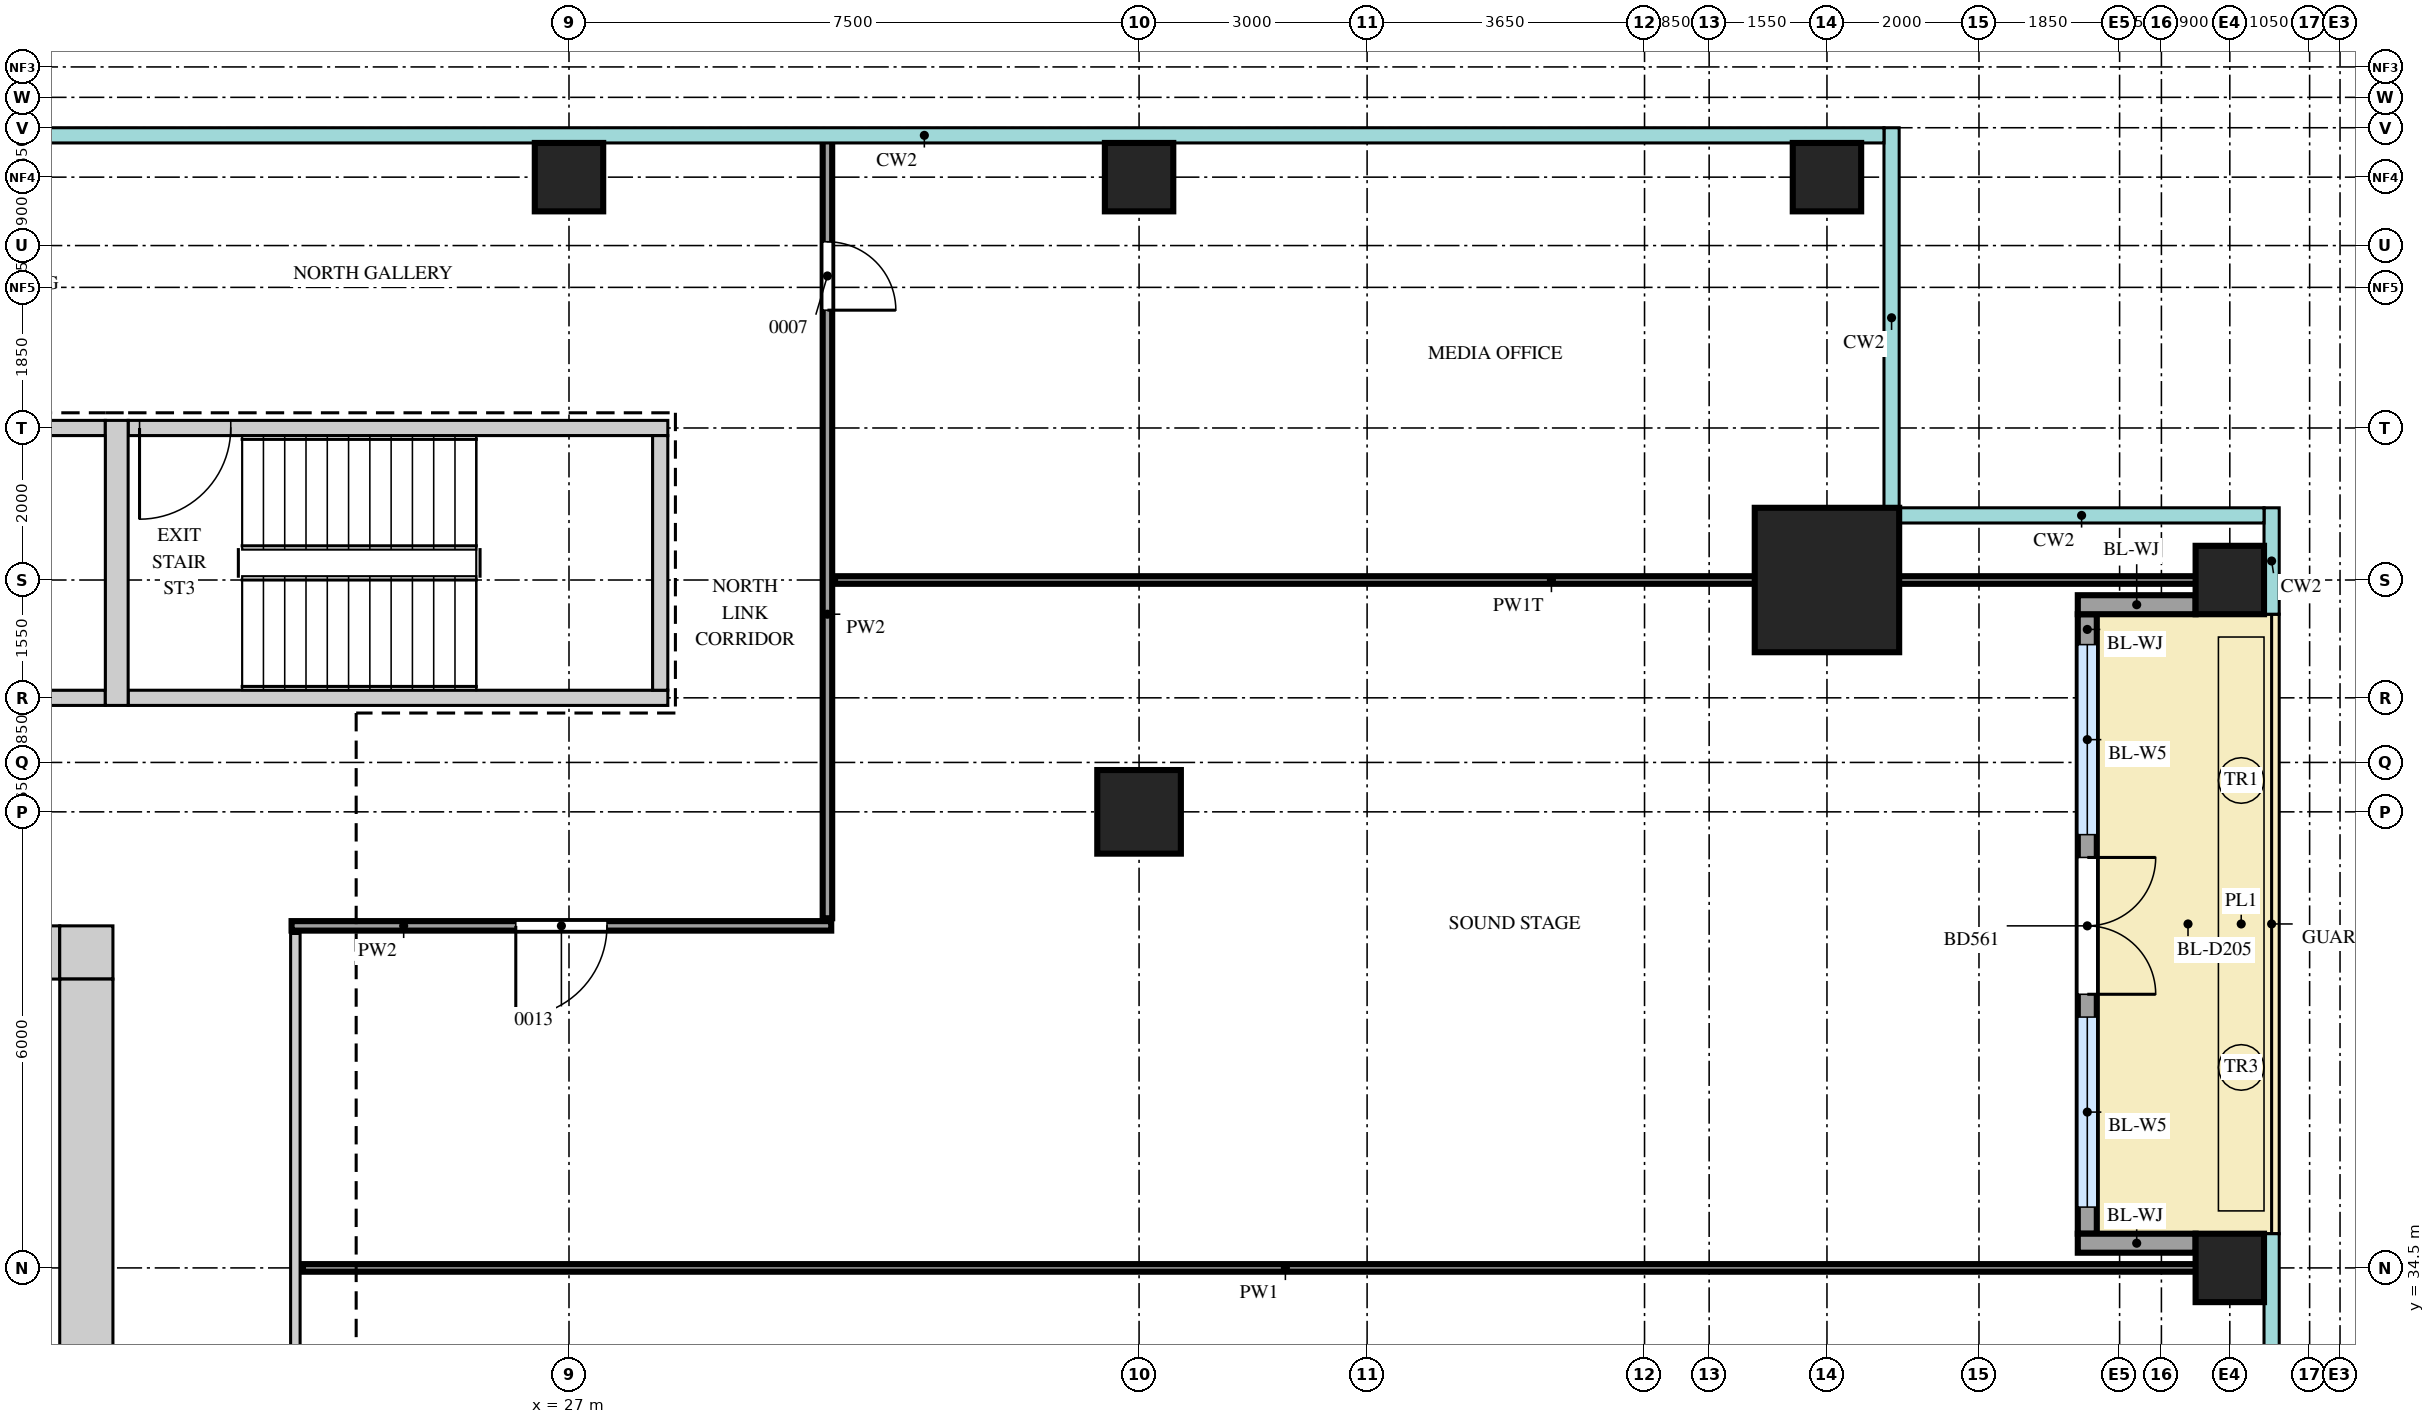
"""IFC4 building model, lengths in metres.
Left out: names, types, materials, properties, quantities, classifications, styles, units other than length and angle.
Written with IfcOpenShell. Run it as: python <this file> out.ifc"""

import sys

from ifc_helpers import new_model, si_unit, direction, frame, frame_2d, origin, origin_2d, place, context, subcontext, project, spatial, rectangle, extrude, source, transform, mapped, element, fill, save


model = new_model("IFC4")
c1 = context("Model", 3, precision=1e-05, world=origin(), true_north=direction((0.0, 1.0)))
c2 = subcontext(c1, "Body", "Model", "MODEL_VIEW")
j1 = project(units=[si_unit("LENGTHUNIT", "METRE"), si_unit("PLANEANGLEUNIT", "RADIAN")], contexts=[c1])
p1 = place(None, origin())
s1 = spatial("IfcSite", under=j1, at=p1, CompositionType="ELEMENT")
p2 = place(p1, origin())
s2 = spatial("IfcBuilding", under=s1, at=p2, CompositionType="ELEMENT")
p3 = place(p2, frame((0.0, 0.0, 250.2)))
s3 = spatial("IfcBuildingStorey", under=s2, at=p3, CompositionType="ELEMENT", Elevation=250.2)
m1 = source(origin(), c2, "Body", "SweptSolid", [
    extrude(rectangle(XDim=13.6, YDim=0.7, at=frame_2d((6.8, 0.0))), origin(), (0.0, 0.0, 1.0), 3.75),
])
p4 = place(p3, frame((6.7, 38.65, 0.0), z_axis=(0.0, 0.0, 1.0), x_axis=(1.0, 0.0, 0.0)))
e1 = element("IfcWall", 1, at=p4, inside=s3, PredefinedType="SHEAR", context=c2, shape_type="MappedRepresentation", body=[
    mapped(m1, transform((0.0, 0.0, 0.0))),
])
m2 = source(origin(), c2, "Body", "SweptSolid", [
    extrude(rectangle(XDim=0.9, YDim=2.1, at=frame_2d((0.45, 1.05))), frame((0.0, 0.36, 0.0), z_axis=(0.0, -1.0, 0.0), x_axis=(1.0, 0.0, 0.0)), (0.0, 0.0, 1.0), 0.72),
])
p5 = place(p4, frame((3.0, 0.0, 0.0)))
e2 = element("IfcOpeningElement", 2, at=p5, cuts=e1, PredefinedType="OPENING", context=c2, shape_type="MappedRepresentation", body=[
    mapped(m2, transform((0.0, 0.0, 0.0))),
])
p6 = place(p4, frame((9.7, 0.0, 0.0)))
e3 = element("IfcOpeningElement", 3, at=p6, cuts=e1, PredefinedType="OPENING", context=c2, shape_type="MappedRepresentation", body=[
    mapped(m2, transform((0.0, 0.0, 0.0))),
])
m3 = source(origin(), c2, "Body", "SweptSolid", [
    extrude(rectangle(XDim=0.7, YDim=0.7, at=frame_2d((0.35, 0.0))), origin(), (0.0, 0.0, 1.0), 3.75),
])
p7 = place(p3, frame((20.3, 38.65, 0.0), z_axis=(0.0, 0.0, 1.0), x_axis=(1.0, 0.0, 0.0)))
e4 = element("IfcWall", 4, at=p7, inside=s3, PredefinedType="SHEAR", context=c2, shape_type="MappedRepresentation", body=[
    mapped(m3, transform((0.0, 0.0, 0.0))),
])
m4 = source(origin(), c2, "Body", "SweptSolid", [
    extrude(rectangle(XDim=22.6, YDim=0.7, at=frame_2d((11.3, 0.0))), origin(), (0.0, 0.0, 1.0), 3.75),
])
p8 = place(p3, frame((20.65, 15.7, 0.0), z_axis=(0.0, 0.0, 1.0), x_axis=(0.0, 1.0, 0.0)))
e5 = element("IfcWall", 5, at=p8, inside=s3, PredefinedType="SHEAR", context=c2, shape_type="MappedRepresentation", body=[
    mapped(m4, transform((0.0, 0.0, 0.0))),
])
m5 = source(origin(), c2, "Body", "SweptSolid", [
    extrude(rectangle(XDim=1.8, YDim=2.1, at=frame_2d((0.9, 1.05))), frame((0.0, 0.36, 0.0), z_axis=(0.0, -1.0, 0.0), x_axis=(1.0, 0.0, 0.0)), (0.0, 0.0, 1.0), 0.72),
])
p9 = place(p8, frame((10.8, 0.0, 0.0)))
e6 = element("IfcOpeningElement", 6, at=p9, cuts=e5, PredefinedType="OPENING", context=c2, shape_type="MappedRepresentation", body=[
    mapped(m5, transform((0.0, 0.0, 0.0))),
])
p10 = place(p8, frame((0.45, 0.0, 0.0)))
e7 = element("IfcOpeningElement", 7, at=p10, cuts=e5, PredefinedType="OPENING", context=c2, shape_type="MappedRepresentation", body=[
    mapped(m2, transform((0.0, 0.0, 0.0))),
])
p11 = place(p8, frame((2.9, 0.0, 0.0)))
e8 = element("IfcOpeningElement", 8, at=p11, cuts=e5, PredefinedType="OPENING", context=c2, shape_type="MappedRepresentation", body=[
    mapped(m2, transform((0.0, 0.0, 0.0))),
])
p12 = place(p8, frame((5.65, 0.0, 0.0)))
e9 = element("IfcOpeningElement", 9, at=p12, cuts=e5, PredefinedType="OPENING", context=c2, shape_type="MappedRepresentation", body=[
    mapped(m2, transform((0.0, 0.0, 0.0))),
])
m6 = source(origin(), c2, "Body", "SweptSolid", [
    extrude(rectangle(XDim=7.0, YDim=0.2, at=frame_2d((3.5, 0.0))), origin(), (0.0, 0.0, 1.0), 3.75),
])
p13 = place(p3, frame((13.9, 45.55, 0.0), z_axis=(0.0, 0.0, 1.0), x_axis=(1.0, 0.0, 0.0)))
e10 = element("IfcWall", 10, at=p13, inside=s3, PredefinedType="SHEAR", context=c2, shape_type="MappedRepresentation", body=[
    mapped(m6, transform((0.0, 0.0, 0.0))),
])
m7 = source(origin(), c2, "Body", "SweptSolid", [
    extrude(rectangle(XDim=1.2, YDim=2.1, at=frame_2d((0.6, 1.05))), frame((0.0, 0.11, 0.0), z_axis=(0.0, -1.0, 0.0), x_axis=(1.0, 0.0, 0.0)), (0.0, 0.0, 1.0), 0.22),
])
p14 = place(p13, frame((0.35, 0.0, 0.0)))
e11 = element("IfcOpeningElement", 11, at=p14, cuts=e10, PredefinedType="OPENING", context=c2, shape_type="MappedRepresentation", body=[
    mapped(m7, transform((0.0, 0.0, 0.0))),
])
p15 = place(p3, frame((13.9, 42.0, 0.0), z_axis=(0.0, 0.0, 1.0), x_axis=(1.0, 0.0, 0.0)))
e12 = element("IfcWall", 12, at=p15, inside=s3, PredefinedType="SHEAR", context=c2, shape_type="MappedRepresentation", body=[
    mapped(m6, transform((0.0, 0.0, 0.0))),
])
m8 = source(origin(), c2, "Body", "SweptSolid", [
    extrude(rectangle(XDim=7.1, YDim=0.2, at=frame_2d((3.55, 0.0))), origin(), (0.0, 0.0, 1.0), 3.75),
])
p16 = place(p3, frame((21.2, 45.55, 0.0), z_axis=(0.0, 0.0, 1.0), x_axis=(1.0, 0.0, 0.0)))
e13 = element("IfcWall", 13, at=p16, inside=s3, PredefinedType="SHEAR", context=c2, shape_type="MappedRepresentation", body=[
    mapped(m8, transform((0.0, 0.0, 0.0))),
])
p17 = place(p16, frame((0.15, 0.0, 0.0)))
e14 = element("IfcOpeningElement", 14, at=p17, cuts=e13, PredefinedType="OPENING", context=c2, shape_type="MappedRepresentation", body=[
    mapped(m7, transform((0.0, 0.0, 0.0))),
])
p18 = place(p3, frame((21.2, 42.0, 0.0), z_axis=(0.0, 0.0, 1.0), x_axis=(1.0, 0.0, 0.0)))
e15 = element("IfcWall", 15, at=p18, inside=s3, PredefinedType="SHEAR", context=c2, shape_type="MappedRepresentation", body=[
    mapped(m8, transform((0.0, 0.0, 0.0))),
])
m9 = source(origin(), c2, "Body", "SweptSolid", [
    extrude(rectangle(XDim=3.75, YDim=0.3, at=frame_2d((1.875, 0.0))), origin(), (0.0, 0.0, 1.0), 3.75),
])
p19 = place(p3, frame((21.05, 41.9, 0.0), z_axis=(0.0, 0.0, 1.0), x_axis=(0.0, 1.0, 0.0)))
e16 = element("IfcWall", 16, at=p19, inside=s3, PredefinedType="SHEAR", context=c2, shape_type="MappedRepresentation", body=[
    mapped(m9, transform((0.0, 0.0, 0.0))),
])
m10 = source(origin(), c2, "Body", "SweptSolid", [
    extrude(rectangle(XDim=3.35, YDim=0.2, at=frame_2d((1.675, 0.0))), origin(), (0.0, 0.0, 1.0), 3.75),
])
p20 = place(p3, frame((28.2, 42.1, 0.0), z_axis=(0.0, 0.0, 1.0), x_axis=(0.0, 1.0, 0.0)))
e17 = element("IfcWall", 17, at=p20, inside=s3, PredefinedType="SHEAR", context=c2, shape_type="MappedRepresentation", body=[
    mapped(m10, transform((0.0, 0.0, 0.0))),
])
m11 = source(origin(), c2, "Body", "SweptSolid", [
    extrude(rectangle(XDim=1.9, YDim=1.9, at=origin_2d()), origin(), (0.0, 0.0, 1.0), 4.0),
])
p21 = place(p3, frame((43.55, 43.55, 0.0), z_axis=(0.0, 0.0, 1.0), x_axis=(1.0, 0.0, 0.0)))
e18 = element("IfcColumn", 18, at=p21, inside=s3, PredefinedType="COLUMN", context=c2, shape_type="MappedRepresentation", body=[
    mapped(m11, transform((0.0, 0.0, 0.0))),
])
m12 = source(origin(), c2, "Body", "SweptSolid", [
    extrude(rectangle(XDim=0.9, YDim=0.9, at=origin_2d()), origin(), (0.0, 0.0, 1.0), 3.75),
])
for number, where, z_axis, x_axis in (
    (19, (48.85, 34.5, 0.0), (0.0, 0.0, 1.0), (1.0, 0.0, 0.0)),
    (20, (48.85, 43.55, 0.0), (0.0, 0.0, 1.0), (1.0, 0.0, 0.0)),
    (21, (27.0, 48.85, 0.0), (0.0, 0.0, 1.0), (1.0, 0.0, 0.0)),
    (22, (34.5, 48.85, 0.0), (0.0, 0.0, 1.0), (1.0, 0.0, 0.0)),
    (23, (43.55, 48.85, 0.0), (0.0, 0.0, 1.0), (1.0, 0.0, 0.0)),
):
    element("IfcColumn", number, at=place(p3, frame(where, z_axis=z_axis, x_axis=x_axis)), inside=s3, PredefinedType="COLUMN", context=c2, shape_type="MappedRepresentation", body=[
        mapped(m12, transform((0.0, 0.0, 0.0))),
    ])
m13 = source(origin(), c2, "Body", "SweptSolid", [
    extrude(rectangle(XDim=1.1, YDim=1.1, at=origin_2d()), origin(), (0.0, 0.0, 1.0), 3.75),
])
p22 = place(p3, frame((34.5, 40.5, 0.0), z_axis=(0.0, 0.0, 1.0), x_axis=(1.0, 0.0, 0.0)))
e24 = element("IfcColumn", 24, at=p22, inside=s3, PredefinedType="COLUMN", context=c2, shape_type="MappedRepresentation", body=[
    mapped(m13, transform((0.0, 0.0, 0.0))),
])
m14 = source(origin(), c2, "Body", "SweptSolid", [
    extrude(rectangle(XDim=8.15, YDim=0.25, at=frame_2d((4.075, 0.0))), origin(), (0.0, 0.0, 1.0), 3.2),
])
p23 = place(p3, frame((46.975, 34.95, 0.0), z_axis=(0.0, 0.0, 1.0), x_axis=(0.0, 1.0, 0.0)))
e25 = element("IfcWall", 25, at=p23, inside=s3, PredefinedType="SOLIDWALL", context=c2, shape_type="MappedRepresentation", body=[
    mapped(m14, transform((0.0, 0.0, 0.0))),
])
m15 = source(origin(), c2, "Body", "SweptSolid", [
    extrude(rectangle(XDim=2.5, YDim=2.4, at=frame_2d((1.25, 1.2))), frame((0.0, 0.135, 0.0), z_axis=(0.0, -1.0, 0.0), x_axis=(1.0, 0.0, 0.0)), (0.0, 0.0, 1.0), 0.27),
])
p24 = place(p23, frame((0.35, 0.0, 0.0)))
e26 = element("IfcOpeningElement", 26, at=p24, cuts=e25, PredefinedType="OPENING", context=c2, shape_type="MappedRepresentation", body=[
    mapped(m15, transform((0.0, 0.0, 0.0))),
])
p25 = place(p23, frame((5.25, 0.0, 0.0)))
e27 = element("IfcOpeningElement", 27, at=p25, cuts=e25, PredefinedType="OPENING", context=c2, shape_type="MappedRepresentation", body=[
    mapped(m15, transform((0.0, 0.0, 0.0))),
])
m16 = source(origin(), c2, "Body", "SweptSolid", [
    extrude(rectangle(XDim=1.8, YDim=2.4, at=frame_2d((0.9, 1.2))), frame((0.0, 0.135, 0.0), z_axis=(0.0, -1.0, 0.0), x_axis=(1.0, 0.0, 0.0)), (0.0, 0.0, 1.0), 0.27),
])
p26 = place(p23, frame((3.15, 0.0, 0.0)))
e28 = element("IfcOpeningElement", 28, at=p26, cuts=e25, PredefinedType="OPENING", context=c2, shape_type="MappedRepresentation", body=[
    mapped(m16, transform((0.0, 0.0, 0.0))),
])
m17 = source(origin(), c2, "Body", "SweptSolid", [
    extrude(rectangle(XDim=1.55, YDim=0.25, at=frame_2d((0.775, 0.0))), origin(), (0.0, 0.0, 1.0), 3.2),
])
for number, where, z_axis, x_axis in (
    (29, (48.4, 34.825, 0.0), (0.0, 0.0, 1.0), (-1.0, 0.0, 0.0)),
    (30, (48.4, 43.225, 0.0), (0.0, 0.0, 1.0), (-1.0, 0.0, 0.0)),
):
    element("IfcWall", number, at=place(p3, frame(where, z_axis=z_axis, x_axis=x_axis)), inside=s3, PredefinedType="SOLIDWALL", context=c2, shape_type="MappedRepresentation", body=[
        mapped(m17, transform((0.0, 0.0, 0.0))),
    ])
m18 = source(origin(), c2, "Body", "SweptSolid", [
    extrude(rectangle(XDim=20.8, YDim=0.125, at=frame_2d((10.4, 0.0))), origin(), (0.0, 0.0, 1.0), 3.8),
])
p27 = place(p3, frame((23.4, 18.1, 0.0), z_axis=(0.0, 0.0, 1.0), x_axis=(0.0, 1.0, 0.0)))
e31 = element("IfcWall", 31, at=p27, inside=s3, PredefinedType="PARTITIONING", context=c2, shape_type="MappedRepresentation", body=[
    mapped(m18, transform((0.0, 0.0, 0.0))),
])
m19 = source(origin(), c2, "Body", "SweptSolid", [
    extrude(rectangle(XDim=1.2, YDim=2.1, at=frame_2d((0.6, 1.05))), frame((0.0, 0.073, 0.0), z_axis=(0.0, -1.0, 0.0), x_axis=(1.0, 0.0, 0.0)), (0.0, 0.0, 1.0), 0.145),
])
p28 = place(p27, frame((12.05, 0.0, 0.0)))
e32 = element("IfcOpeningElement", 32, at=p28, cuts=e31, PredefinedType="OPENING", context=c2, shape_type="MappedRepresentation", body=[
    mapped(m19, transform((0.0, 0.0, 0.0))),
])
m20 = source(origin(), c2, "Body", "SweptSolid", [
    extrude(rectangle(XDim=25.85, YDim=0.1, at=frame_2d((12.925, 0.0))), origin(), (0.0, 0.0, 1.0), 3.8),
])
p29 = place(p3, frame((23.5, 34.5, 0.0), z_axis=(0.0, 0.0, 1.0), x_axis=(1.0, 0.0, 0.0)))
e33 = element("IfcWall", 33, at=p29, inside=s3, PredefinedType="PARTITIONING", context=c2, shape_type="MappedRepresentation", body=[
    mapped(m20, transform((0.0, 0.0, 0.0))),
])
m21 = source(origin(), c2, "Body", "SweptSolid", [
    extrude(rectangle(XDim=7.1, YDim=0.125, at=frame_2d((3.55, 0.0))), origin(), (0.0, 0.0, 1.0), 3.8),
])
p30 = place(p3, frame((23.35, 39.0, 0.0), z_axis=(0.0, 0.0, 1.0), x_axis=(1.0, 0.0, 0.0)))
e34 = element("IfcWall", 34, at=p30, inside=s3, PredefinedType="PARTITIONING", context=c2, shape_type="MappedRepresentation", body=[
    mapped(m21, transform((0.0, 0.0, 0.0))),
])
p31 = place(p30, frame((2.95, 0.0, 0.0)))
e35 = element("IfcOpeningElement", 35, at=p31, cuts=e34, PredefinedType="OPENING", context=c2, shape_type="MappedRepresentation", body=[
    mapped(m19, transform((0.0, 0.0, 0.0))),
])
m22 = source(origin(), c2, "Body", "SweptSolid", [
    extrude(rectangle(XDim=10.25, YDim=0.125, at=frame_2d((5.125, 0.0))), origin(), (0.0, 0.0, 1.0), 3.8),
])
p32 = place(p3, frame((30.4, 39.1, 0.0), z_axis=(0.0, 0.0, 1.0), x_axis=(0.0, 1.0, 0.0)))
e36 = element("IfcWall", 36, at=p32, inside=s3, PredefinedType="PARTITIONING", context=c2, shape_type="MappedRepresentation", body=[
    mapped(m22, transform((0.0, 0.0, 0.0))),
])
m23 = source(origin(), c2, "Body", "SweptSolid", [
    extrude(rectangle(XDim=0.9, YDim=2.1, at=frame_2d((0.45, 1.05))), frame((0.0, 0.073, 0.0), z_axis=(0.0, -1.0, 0.0), x_axis=(1.0, 0.0, 0.0)), (0.0, 0.0, 1.0), 0.145),
])
p33 = place(p32, frame((8.0, 0.0, 0.0)))
e37 = element("IfcOpeningElement", 37, at=p33, cuts=e36, PredefinedType="OPENING", context=c2, shape_type="MappedRepresentation", body=[
    mapped(m23, transform((0.0, 0.0, 0.0))),
])
m24 = source(origin(), c2, "Body", "SweptSolid", [
    extrude(rectangle(XDim=18.85, YDim=0.1, at=frame_2d((9.425, 0.0))), origin(), (0.0, 0.0, 1.0), 3.3),
])
p34 = place(p3, frame((30.5, 43.55, 0.0), z_axis=(0.0, 0.0, 1.0), x_axis=(1.0, 0.0, 0.0)))
e38 = element("IfcWall", 38, at=p34, inside=s3, PredefinedType="PARTITIONING", context=c2, shape_type="MappedRepresentation", body=[
    mapped(m24, transform((0.0, 0.0, 0.0))),
])
m25 = source(origin(), c2, "Body", "SweptSolid", [
    extrude(rectangle(XDim=2.5, YDim=2.4, at=frame_2d((1.25, 1.2))), frame((0.0, 0.03, 0.0), z_axis=(0.0, -1.0, 0.0), x_axis=(1.0, 0.0, 0.0)), (0.0, 0.0, 1.0), 0.06),
])
p35 = place(p24, origin())
e39 = element("IfcWindow", 39, at=p35, inside=s3, PartitioningType="SINGLE_PANEL", PredefinedType="WINDOW", context=c2, shape_type="MappedRepresentation", body=[
    mapped(m25, transform((0.0, 0.0, 0.0))),
])
fill(e26, e39)
p36 = place(p25, origin())
e40 = element("IfcWindow", 40, at=p36, inside=s3, PartitioningType="SINGLE_PANEL", PredefinedType="WINDOW", context=c2, shape_type="MappedRepresentation", body=[
    mapped(m25, transform((0.0, 0.0, 0.0))),
])
fill(e27, e40)
m26 = source(origin(), c2, "Body", "SweptSolid", [
    extrude(rectangle(XDim=1.8, YDim=2.4, at=frame_2d((0.9, 1.2))), frame((0.0, 0.025, 0.0), z_axis=(0.0, -1.0, 0.0), x_axis=(1.0, 0.0, 0.0)), (0.0, 0.0, 1.0), 0.05),
])
p37 = place(p26, origin())
e41 = element("IfcDoor", 41, at=p37, inside=s3, OperationType="DOUBLE_DOOR_DOUBLE_SWING", PredefinedType="DOOR", context=c2, shape_type="MappedRepresentation", body=[
    mapped(m26, transform((0.0, 0.0, 0.0))),
])
fill(e28, e41)
m27 = source(origin(), c2, "Body", "SweptSolid", [
    extrude(rectangle(XDim=1.2, YDim=2.1, at=frame_2d((0.6, 1.05))), frame((0.0, 0.025, 0.0), z_axis=(0.0, -1.0, 0.0), x_axis=(1.0, 0.0, 0.0)), (0.0, 0.0, 1.0), 0.05),
])
p38 = place(p31, origin())
e42 = element("IfcDoor", 42, at=p38, inside=s3, OperationType="SINGLE_SWING_LEFT", PredefinedType="DOOR", context=c2, shape_type="MappedRepresentation", body=[
    mapped(m27, transform((0.0, 0.0, 0.0))),
])
fill(e35, e42)
m28 = source(origin(), c2, "Body", "SweptSolid", [
    extrude(rectangle(XDim=0.9, YDim=2.1, at=frame_2d((0.45, 1.05))), frame((0.0, 0.025, 0.0), z_axis=(0.0, -1.0, 0.0), x_axis=(1.0, 0.0, 0.0)), (0.0, 0.0, 1.0), 0.05),
])
p39 = place(p33, origin())
e43 = element("IfcDoor", 43, at=p39, inside=s3, OperationType="SINGLE_SWING_LEFT", PredefinedType="DOOR", context=c2, shape_type="MappedRepresentation", body=[
    mapped(m28, transform((0.0, 0.0, 0.0))),
])
fill(e37, e43)
p40 = place(p17, origin())
e44 = element("IfcDoor", 44, at=p40, inside=s3, OperationType="SINGLE_SWING_LEFT", PredefinedType="DOOR", context=c2, shape_type="MappedRepresentation", body=[
    mapped(m27, transform((0.0, 0.0, 0.0))),
])
fill(e14, e44)
save(model, sys.argv[1])
